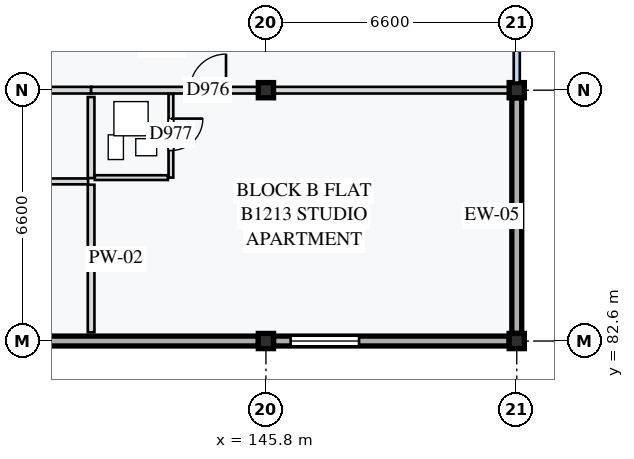
"""IFC4 building model, lengths in metres.
Left out: names, types, materials, properties, quantities, classifications, styles, units other than length and angle.
Written with IfcOpenShell. Run it as: python <this file> out.ifc"""

import sys

from ifc_helpers import new_model, si_unit, direction, frame, frame_2d, origin, origin_2d, place, context, subcontext, project, spatial, rectangle, extrude, element, fill, save


model = new_model("IFC4")
c1 = context("Model", 3, precision=1e-05, world=origin(), true_north=direction((0.0, 1.0)))
c2 = subcontext(c1, "Body", "Model", "MODEL_VIEW")
j1 = project(units=[si_unit("LENGTHUNIT", "METRE"), si_unit("PLANEANGLEUNIT", "RADIAN")], contexts=[c1])
p1 = place(None, origin())
s1 = spatial("IfcSite", under=j1, at=p1, CompositionType="ELEMENT")
p2 = place(p1, origin())
s2 = spatial("IfcBuilding", under=s1, at=p2, CompositionType="ELEMENT")
p3 = place(p2, frame((0.0, 0.0, 40.4)))
s3 = spatial("IfcBuildingStorey", under=s2, at=p3, CompositionType="ELEMENT", Elevation=40.4)
for number, where, z_axis, x_axis in (
    (1, (145.8, 82.6, 0.0), (0.0, 0.0, 1.0), (1.0, 0.0, 0.0)),
    (2, (145.8, 89.2, 0.0), (0.0, 0.0, 1.0), (1.0, 0.0, 0.0)),
    (3, (152.4, 82.6, 0.0), (0.0, 0.0, 1.0), (1.0, 0.0, 0.0)),
    (4, (152.4, 89.2, 0.0), (0.0, 0.0, 1.0), (1.0, 0.0, 0.0)),
):
    element("IfcColumn", number, at=place(p3, frame(where, z_axis=z_axis, x_axis=x_axis)), inside=s3, PredefinedType="COLUMN", context=c2, shape_type="SweptSolid", body=[
        extrude(rectangle(XDim=0.4, YDim=0.4, at=origin_2d()), origin(), (0.0, 0.0, 1.0), 3.2),
    ])
p4 = place(p3, frame((139.4, 82.6, 0.0), z_axis=(0.0, 0.0, 1.0), x_axis=(1.0, 0.0, 0.0)))
e5 = element("IfcWall", 5, at=p4, inside=s3, PredefinedType="STANDARD", context=c2, shape_type="SweptSolid", body=[
    extrude(rectangle(XDim=6.2, YDim=0.26, at=frame_2d((3.1, 0.0))), origin(), (0.0, 0.0, 1.0), 2.6),
])
p5 = place(p3, frame((146.0, 82.6, 0.0), z_axis=(0.0, 0.0, 1.0), x_axis=(1.0, 0.0, 0.0)))
e6 = element("IfcWall", 6, at=p5, inside=s3, PredefinedType="STANDARD", context=c2, shape_type="SweptSolid", body=[
    extrude(rectangle(XDim=6.2, YDim=0.26, at=frame_2d((3.1, 0.0))), origin(), (0.0, 0.0, 1.0), 2.6),
])
p6 = place(p5, frame((0.45, 0.0, 0.85)))
e7 = element("IfcOpeningElement", 7, at=p6, cuts=e6, PredefinedType="OPENING", context=c2, shape_type="SweptSolid", body=[
    extrude(rectangle(XDim=1.8, YDim=1.35, at=frame_2d((0.9, 0.675))), frame((0.0, 0.14, 0.0), z_axis=(0.0, -1.0, 0.0), x_axis=(1.0, 0.0, 0.0)), (0.0, 0.0, 1.0), 0.28),
])
p7 = place(p3, frame((152.4, 82.8, 0.0), z_axis=(0.0, 0.0, 1.0), x_axis=(0.0, 1.0, 0.0)))
e8 = element("IfcWall", 8, at=p7, inside=s3, PredefinedType="STANDARD", context=c2, shape_type="SweptSolid", body=[
    extrude(rectangle(XDim=6.2, YDim=0.26, at=frame_2d((3.1, 0.0))), origin(), (0.0, 0.0, 1.0), 2.65),
])
p8 = place(p3, frame((132.6, 89.2, 0.0), z_axis=(0.0, 0.0, 1.0), x_axis=(1.0, 0.0, 0.0)))
e9 = element("IfcWall", 9, at=p8, inside=s3, PredefinedType="PARTITIONING", context=c2, shape_type="SweptSolid", body=[
    extrude(rectangle(XDim=8.6, YDim=0.175, at=frame_2d((4.3, 0.0))), origin(), (0.0, 0.0, 1.0), 2.55),
])
p9 = place(p8, frame((3.725, 0.0, 0.0)))
e10 = element("IfcOpeningElement", 10, at=p9, cuts=e9, PredefinedType="OPENING", context=c2, shape_type="SweptSolid", body=[
    extrude(rectangle(XDim=0.95, YDim=2.16, at=frame_2d((0.475, 1.08))), frame((0.0, 0.097, 0.0), z_axis=(0.0, -1.0, 0.0), x_axis=(1.0, 0.0, 0.0)), (0.0, 0.0, 1.0), 0.195),
])
p10 = place(p3, frame((139.188, 86.8, 0.0), z_axis=(0.0, 0.0, 1.0), x_axis=(1.0, 0.0, 0.0)))
e11 = element("IfcWall", 11, at=p10, inside=s3, PredefinedType="PARTITIONING", context=c2, shape_type="SweptSolid", body=[
    extrude(rectangle(XDim=1.933, YDim=0.155, at=frame_2d((0.966, 0.0))), origin(), (0.0, 0.0, 1.0), 2.945),
])
p11 = place(p3, frame((141.2, 89.02, 0.0), z_axis=(0.0, 0.0, 1.0), x_axis=(0.0, -1.0, 0.0)))
e12 = element("IfcWall", 12, at=p11, inside=s3, PredefinedType="PARTITIONING", context=c2, shape_type="SweptSolid", body=[
    extrude(rectangle(XDim=2.133, YDim=0.175, at=frame_2d((1.066, 0.0))), origin(), (0.0, 0.0, 1.0), 2.945),
])
p12 = place(p3, frame((141.2, 86.712, 0.0), z_axis=(0.0, 0.0, 1.0), x_axis=(0.0, -1.0, 0.0)))
e13 = element("IfcWall", 13, at=p12, inside=s3, PredefinedType="PARTITIONING", context=c2, shape_type="SweptSolid", body=[
    extrude(rectangle(XDim=3.882, YDim=0.175, at=frame_2d((1.941, 0.0))), origin(), (0.0, 0.0, 1.0), 2.945),
])
p13 = place(p3, frame((141.2, 89.2, 0.0), z_axis=(0.0, 0.0, 1.0), x_axis=(1.0, 0.0, 0.0)))
e14 = element("IfcWall", 14, at=p13, inside=s3, PredefinedType="PARTITIONING", context=c2, shape_type="SweptSolid", body=[
    extrude(rectangle(XDim=11.2, YDim=0.175, at=frame_2d((5.6, 0.0))), origin(), (0.0, 0.0, 1.0), 2.55),
])
p14 = place(p13, frame((2.6, 0.0, 0.0)))
e15 = element("IfcOpeningElement", 15, at=p14, cuts=e14, PredefinedType="OPENING", context=c2, shape_type="SweptSolid", body=[
    extrude(rectangle(XDim=0.95, YDim=2.16, at=frame_2d((0.475, 1.08))), frame((0.0, 0.097, 0.0), z_axis=(0.0, -1.0, 0.0), x_axis=(1.0, 0.0, 0.0)), (0.0, 0.0, 1.0), 0.195),
])
p15 = place(p3, frame((143.3, 89.103, 0.0), z_axis=(0.0, 0.0, 1.0), x_axis=(0.0, -1.0, 0.0)))
e16 = element("IfcWall", 16, at=p15, inside=s3, PredefinedType="PARTITIONING", context=c2, shape_type="SweptSolid", body=[
    extrude(rectangle(XDim=2.203, YDim=0.125, at=frame_2d((1.101, 0.0))), origin(), (0.0, 0.0, 1.0), 2.945),
])
p16 = place(p15, frame((0.65, 0.0, 0.0)))
e17 = element("IfcOpeningElement", 17, at=p16, cuts=e16, PredefinedType="OPENING", context=c2, shape_type="SweptSolid", body=[
    extrude(rectangle(XDim=0.84, YDim=2.06, at=frame_2d((0.42, 1.03))), frame((0.0, 0.073, 0.0), z_axis=(0.0, -1.0, 0.0), x_axis=(1.0, 0.0, 0.0)), (0.0, 0.0, 1.0), 0.145),
])
p17 = place(p3, frame((141.298, 86.9, 0.0), z_axis=(0.0, 0.0, 1.0), x_axis=(1.0, 0.0, 0.0)))
e18 = element("IfcWall", 18, at=p17, inside=s3, PredefinedType="PARTITIONING", context=c2, shape_type="SweptSolid", body=[
    extrude(rectangle(XDim=1.922, YDim=0.125, at=frame_2d((0.961, 0.0))), origin(), (0.0, 0.0, 1.0), 2.945),
])
p18 = place(p6, origin())
e19 = element("IfcWindow", 19, at=p18, inside=s3, PartitioningType="SINGLE_PANEL", PredefinedType="WINDOW", context=c2, shape_type="SweptSolid", body=[
    extrude(rectangle(XDim=1.8, YDim=1.35, at=frame_2d((0.9, 0.675))), frame((0.0, 0.03, 0.0), z_axis=(0.0, -1.0, 0.0), x_axis=(1.0, 0.0, 0.0)), (0.0, 0.0, 1.0), 0.06),
])
fill(e7, e19)
p19 = place(p14, origin())
e20 = element("IfcDoor", 20, at=p19, inside=s3, OperationType="SINGLE_SWING_RIGHT", PredefinedType="DOOR", context=c2, shape_type="SweptSolid", body=[
    extrude(rectangle(XDim=0.95, YDim=2.16, at=frame_2d((0.475, 1.08))), frame((0.0, 0.025, 0.0), z_axis=(0.0, -1.0, 0.0), x_axis=(1.0, 0.0, 0.0)), (0.0, 0.0, 1.0), 0.05),
])
fill(e15, e20)
p20 = place(p16, origin())
e21 = element("IfcDoor", 21, at=p20, inside=s3, OperationType="SINGLE_SWING_LEFT", PredefinedType="DOOR", context=c2, shape_type="SweptSolid", body=[
    extrude(rectangle(XDim=0.84, YDim=2.06, at=frame_2d((0.42, 1.03))), frame((0.0, 0.025, 0.0), z_axis=(0.0, -1.0, 0.0), x_axis=(1.0, 0.0, 0.0)), (0.0, 0.0, 1.0), 0.05),
])
fill(e17, e21)
save(model, sys.argv[1])
